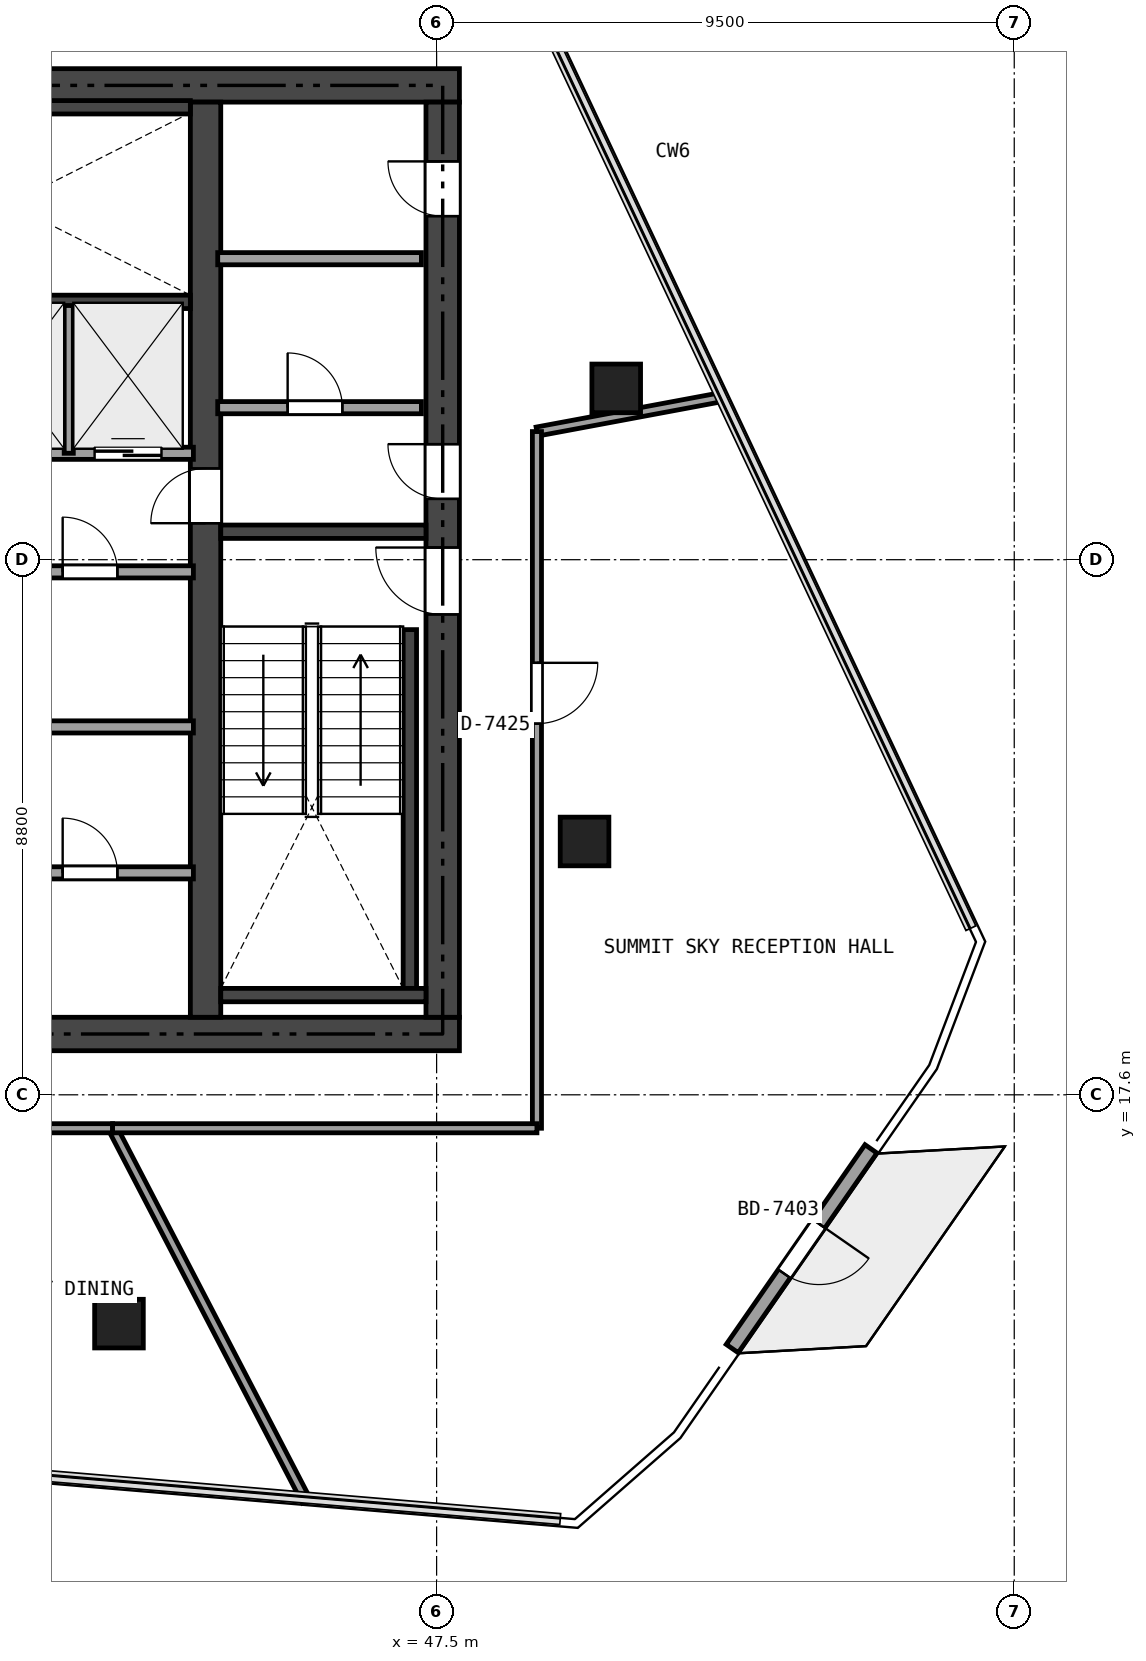
"""IFC4 building model, lengths in metres.
Left out: names, types, materials, properties, quantities, classifications, styles, units other than length and angle.
Written with IfcOpenShell. Run it as: python <this file> out.ifc"""

import sys

from ifc_helpers import new_model, si_unit, direction, frame, frame_2d, origin, origin_2d, place, context, subcontext, project, spatial, rectangle, extrude, element, fill, save


model = new_model("IFC4")
c1 = context("Model", 3, precision=1e-05, world=origin(), true_north=direction((0.0, 1.0)))
c2 = subcontext(c1, "Body", "Model", "MODEL_VIEW")
j1 = project(units=[si_unit("LENGTHUNIT", "METRE"), si_unit("PLANEANGLEUNIT", "RADIAN")], contexts=[c1])
p1 = place(None, origin())
s1 = spatial("IfcSite", under=j1, at=p1, CompositionType="ELEMENT")
p2 = place(p1, origin())
s2 = spatial("IfcBuilding", under=s1, at=p2, CompositionType="ELEMENT")
p3 = place(p2, frame((0.0, 0.0, 275.1)))
s3 = spatial("IfcBuildingStorey", under=s2, at=p3, CompositionType="ELEMENT", Elevation=275.1)
p4 = place(p3, frame((26.525, 18.6, 0.0), z_axis=(0.0, 0.0, 1.0), x_axis=(1.0, 0.0, 0.0)))
e1 = element("IfcWall", 1, at=p4, inside=s3, PredefinedType="SHEAR", context=c2, shape_type="SweptSolid", body=[
    extrude(rectangle(XDim=21.35, YDim=0.55, at=frame_2d((10.675, 0.0))), origin(), (0.0, 0.0, 1.0), 3.92),
])
p5 = place(p4, frame((12.4, 0.0, 0.0)))
e2 = element("IfcOpeningElement", 2, at=p5, cuts=e1, PredefinedType="OPENING", context=c2, shape_type="SweptSolid", body=[
    extrude(rectangle(XDim=1.15, YDim=2.15, at=frame_2d((0.575, 1.075))), frame((0.0, 0.285, 0.0), z_axis=(0.0, -1.0, 0.0), x_axis=(1.0, 0.0, 0.0)), (0.0, 0.0, 1.0), 0.57),
])
p6 = place(p4, frame((5.225, 0.0, 0.0)))
e3 = element("IfcOpeningElement", 3, at=p6, cuts=e1, PredefinedType="OPENING", context=c2, shape_type="SweptSolid", body=[
    extrude(rectangle(XDim=0.9, YDim=2.1, at=frame_2d((0.45, 1.05))), frame((0.0, 0.285, 0.0), z_axis=(0.0, -1.0, 0.0), x_axis=(1.0, 0.0, 0.0)), (0.0, 0.0, 1.0), 0.57),
])
p7 = place(p3, frame((26.525, 34.2, 0.0), z_axis=(0.0, 0.0, 1.0), x_axis=(1.0, 0.0, 0.0)))
e4 = element("IfcWall", 4, at=p7, inside=s3, PredefinedType="SHEAR", context=c2, shape_type="SweptSolid", body=[
    extrude(rectangle(XDim=21.35, YDim=0.55, at=frame_2d((10.675, 0.0))), origin(), (0.0, 0.0, 1.0), 3.92),
])
p8 = place(p7, frame((9.675, 0.0, 0.0)))
e5 = element("IfcOpeningElement", 5, at=p8, cuts=e4, PredefinedType="OPENING", context=c2, shape_type="SweptSolid", body=[
    extrude(rectangle(XDim=1.1, YDim=2.15, at=frame_2d((0.55, 1.075))), frame((0.0, 0.285, 0.0), z_axis=(0.0, -1.0, 0.0), x_axis=(1.0, 0.0, 0.0)), (0.0, 0.0, 1.0), 0.57),
])
p9 = place(p7, frame((1.925, 0.0, 0.0)))
e6 = element("IfcOpeningElement", 6, at=p9, cuts=e4, PredefinedType="OPENING", context=c2, shape_type="SweptSolid", body=[
    extrude(rectangle(XDim=0.9, YDim=2.1, at=frame_2d((0.45, 1.05))), frame((0.0, 0.285, 0.0), z_axis=(0.0, -1.0, 0.0), x_axis=(1.0, 0.0, 0.0)), (0.0, 0.0, 1.0), 0.57),
])
p10 = place(p7, frame((6.225, 0.0, 0.0)))
e7 = element("IfcOpeningElement", 7, at=p10, cuts=e4, PredefinedType="OPENING", context=c2, shape_type="SweptSolid", body=[
    extrude(rectangle(XDim=0.9, YDim=2.1, at=frame_2d((0.45, 1.05))), frame((0.0, 0.285, 0.0), z_axis=(0.0, -1.0, 0.0), x_axis=(1.0, 0.0, 0.0)), (0.0, 0.0, 1.0), 0.57),
])
p11 = place(p3, frame((47.6, 18.875, 0.0), z_axis=(0.0, 0.0, 1.0), x_axis=(0.0, 1.0, 0.0)))
e8 = element("IfcWall", 8, at=p11, inside=s3, PredefinedType="SHEAR", context=c2, shape_type="SweptSolid", body=[
    extrude(rectangle(XDim=15.05, YDim=0.55, at=frame_2d((7.525, 0.0))), origin(), (0.0, 0.0, 1.0), 3.92),
])
p12 = place(p11, frame((6.625, 0.0, 0.0)))
e9 = element("IfcOpeningElement", 9, at=p12, cuts=e8, PredefinedType="OPENING", context=c2, shape_type="SweptSolid", body=[
    extrude(rectangle(XDim=1.1, YDim=2.15, at=frame_2d((0.55, 1.075))), frame((0.0, 0.285, 0.0), z_axis=(0.0, -1.0, 0.0), x_axis=(1.0, 0.0, 0.0)), (0.0, 0.0, 1.0), 0.57),
])
p13 = place(p11, frame((8.525, 0.0, 0.0)))
e10 = element("IfcOpeningElement", 10, at=p13, cuts=e8, PredefinedType="OPENING", context=c2, shape_type="SweptSolid", body=[
    extrude(rectangle(XDim=0.9, YDim=2.1, at=frame_2d((0.45, 1.05))), frame((0.0, 0.285, 0.0), z_axis=(0.0, -1.0, 0.0), x_axis=(1.0, 0.0, 0.0)), (0.0, 0.0, 1.0), 0.57),
])
p14 = place(p11, frame((13.175, 0.0, 0.0)))
e11 = element("IfcOpeningElement", 11, at=p14, cuts=e8, PredefinedType="OPENING", context=c2, shape_type="SweptSolid", body=[
    extrude(rectangle(XDim=0.9, YDim=2.1, at=frame_2d((0.45, 1.05))), frame((0.0, 0.285, 0.0), z_axis=(0.0, -1.0, 0.0), x_axis=(1.0, 0.0, 0.0)), (0.0, 0.0, 1.0), 0.57),
])
p15 = place(p3, frame((43.7, 18.875, 0.0), z_axis=(0.0, 0.0, 1.0), x_axis=(0.0, 1.0, 0.0)))
e12 = element("IfcWall", 12, at=p15, inside=s3, PredefinedType="SHEAR", context=c2, shape_type="SweptSolid", body=[
    extrude(rectangle(XDim=15.05, YDim=0.5, at=frame_2d((7.525, 0.0))), origin(), (0.0, 0.0, 1.0), 3.92),
])
p16 = place(p15, frame((8.125, 0.0, 0.0)))
e13 = element("IfcOpeningElement", 13, at=p16, cuts=e12, PredefinedType="OPENING", context=c2, shape_type="SweptSolid", body=[
    extrude(rectangle(XDim=0.9, YDim=2.1, at=frame_2d((0.45, 1.05))), frame((0.0, 0.26, 0.0), z_axis=(0.0, -1.0, 0.0), x_axis=(1.0, 0.0, 0.0)), (0.0, 0.0, 1.0), 0.52),
])
p17 = place(p3, frame((43.95, 26.86, 0.0), z_axis=(0.0, 0.0, 1.0), x_axis=(1.0, 0.0, 0.0)))
e14 = element("IfcWall", 14, at=p17, inside=s3, PredefinedType="SHEAR", context=c2, shape_type="SweptSolid", body=[
    extrude(rectangle(XDim=3.375, YDim=0.22, at=frame_2d((1.688, 0.0))), origin(), (0.0, 0.0, 1.0), 3.92),
])
p18 = place(p3, frame((47.06, 19.35, 0.0), z_axis=(0.0, 0.0, 1.0), x_axis=(0.0, 1.0, 0.0)))
e15 = element("IfcWall", 15, at=p18, inside=s3, PredefinedType="SHEAR", context=c2, shape_type="SweptSolid", body=[
    extrude(rectangle(XDim=5.9, YDim=0.22, at=frame_2d((2.95, 0.0))), origin(), (0.0, 0.0, 1.0), 3.92),
])
p19 = place(p3, frame((43.95, 19.24, 0.0), z_axis=(0.0, 0.0, 1.0), x_axis=(1.0, 0.0, 0.0)))
e16 = element("IfcWall", 16, at=p19, inside=s3, PredefinedType="SHEAR", context=c2, shape_type="SweptSolid", body=[
    extrude(rectangle(XDim=3.375, YDim=0.22, at=frame_2d((1.688, 0.0))), origin(), (0.0, 0.0, 1.0), 3.92),
])
p20 = place(p3, frame((35.84, 30.64, 0.0), z_axis=(0.0, 0.0, 1.0), x_axis=(1.0, 0.0, 0.0)))
e17 = element("IfcWall", 17, at=p20, inside=s3, PredefinedType="SHEAR", context=c2, shape_type="SweptSolid", body=[
    extrude(rectangle(XDim=7.61, YDim=0.22, at=frame_2d((3.805, 0.0))), origin(), (0.0, 0.0, 1.0), 3.92),
])
p21 = place(p3, frame((37.55, 33.84, 0.0), z_axis=(0.0, 0.0, 1.0), x_axis=(1.0, 0.0, 0.0)))
e18 = element("IfcWall", 18, at=p21, inside=s3, PredefinedType="SHEAR", context=c2, shape_type="SweptSolid", body=[
    extrude(rectangle(XDim=5.9, YDim=0.22, at=frame_2d((2.95, 0.0))), origin(), (0.0, 0.0, 1.0), 3.92),
])
for number, where, z_axis, x_axis in (
    (19, (50.454, 29.217, 0.0), (0.0, 0.0, 1.0), (1.0, 0.0, 0.0)),
    (20, (42.276, 13.837, 0.0), (0.0, 0.0, 1.0), (1.0, 0.0, 0.0)),
    (21, (49.933, 21.766, 0.0), (0.0, 0.0, 1.0), (1.0, 0.0, 0.0)),
):
    element("IfcColumn", number, at=place(p3, frame(where, z_axis=z_axis, x_axis=x_axis)), inside=s3, PredefinedType="COLUMN", context=c2, shape_type="SweptSolid", body=[
        extrude(rectangle(XDim=0.8, YDim=0.8, at=origin_2d()), origin(), (0.0, 0.0, 1.0), 3.92),
    ])
p22 = place(p3, frame((54.644, 16.711, 0.0), z_axis=(0.0, 0.0, 1.0), x_axis=(-0.570644055542, -0.821197516968, 0.0)))
e22 = element("IfcWall", 22, at=p22, inside=s3, PredefinedType="SOLIDWALL", context=c2, shape_type="SweptSolid", body=[
    extrude(rectangle(XDim=3.999, YDim=0.24, at=frame_2d((2.0, 0.0))), origin(), (0.0, 0.0, 1.0), 3.92),
])
p23 = place(p22, frame((1.5, 0.0, 0.0)))
e23 = element("IfcOpeningElement", 23, at=p23, cuts=e22, PredefinedType="OPENING", context=c2, shape_type="SweptSolid", body=[
    extrude(rectangle(XDim=1.0, YDim=2.15, at=frame_2d((0.5, 1.075))), frame((0.0, 0.13, 0.0), z_axis=(0.0, -1.0, 0.0), x_axis=(1.0, 0.0, 0.0)), (0.0, 0.0, 1.0), 0.26),
])
p24 = place(p3, frame((43.9, 28.9, 0.0), z_axis=(0.0, 0.0, 1.0), x_axis=(1.0, 0.0, 0.0)))
e24 = element("IfcWall", 24, at=p24, inside=s3, PredefinedType="SOLIDWALL", context=c2, shape_type="SweptSolid", body=[
    extrude(rectangle(XDim=3.35, YDim=0.2, at=frame_2d((1.675, 0.0))), origin(), (0.0, 0.0, 1.0), 3.92),
])
p25 = place(p24, frame((1.15, 0.0, 0.0)))
e25 = element("IfcOpeningElement", 25, at=p25, cuts=e24, PredefinedType="OPENING", context=c2, shape_type="SweptSolid", body=[
    extrude(rectangle(XDim=0.9, YDim=2.1, at=frame_2d((0.45, 1.05))), frame((0.0, 0.11, 0.0), z_axis=(0.0, -1.0, 0.0), x_axis=(1.0, 0.0, 0.0)), (0.0, 0.0, 1.0), 0.22),
])
p26 = place(p3, frame((43.9, 31.35, 0.0), z_axis=(0.0, 0.0, 1.0), x_axis=(1.0, 0.0, 0.0)))
e26 = element("IfcWall", 26, at=p26, inside=s3, PredefinedType="SOLIDWALL", context=c2, shape_type="SweptSolid", body=[
    extrude(rectangle(XDim=3.35, YDim=0.2, at=frame_2d((1.675, 0.0))), origin(), (0.0, 0.0, 1.0), 3.549),
])
p27 = place(p3, frame((35.62, 28.15, 0.0), z_axis=(0.0, 0.0, 1.0), x_axis=(1.0, 0.0, 0.0)))
e27 = element("IfcWall", 27, at=p27, inside=s3, PredefinedType="SOLIDWALL", context=c2, shape_type="SweptSolid", body=[
    extrude(rectangle(XDim=7.88, YDim=0.2, at=frame_2d((3.94, 0.0))), origin(), (0.0, 0.0, 1.0), 3.92),
])
p28 = place(p27, frame((0.405, 0.0, 0.0)))
e28 = element("IfcOpeningElement", 28, at=p28, cuts=e27, PredefinedType="OPENING", context=c2, shape_type="SweptSolid", body=[
    extrude(rectangle(XDim=1.1, YDim=2.15, at=frame_2d((0.55, 1.075))), frame((0.0, 0.11, 0.0), z_axis=(0.0, -1.0, 0.0), x_axis=(1.0, 0.0, 0.0)), (0.0, 0.0, 1.0), 0.22),
])
p29 = place(p27, frame((2.355, 0.0, 0.0)))
e29 = element("IfcOpeningElement", 29, at=p29, cuts=e27, PredefinedType="OPENING", context=c2, shape_type="SweptSolid", body=[
    extrude(rectangle(XDim=1.1, YDim=2.15, at=frame_2d((0.55, 1.075))), frame((0.0, 0.11, 0.0), z_axis=(0.0, -1.0, 0.0), x_axis=(1.0, 0.0, 0.0)), (0.0, 0.0, 1.0), 0.22),
])
p30 = place(p27, frame((4.305, 0.0, 0.0)))
e30 = element("IfcOpeningElement", 30, at=p30, cuts=e27, PredefinedType="OPENING", context=c2, shape_type="SweptSolid", body=[
    extrude(rectangle(XDim=1.1, YDim=2.15, at=frame_2d((0.55, 1.075))), frame((0.0, 0.11, 0.0), z_axis=(0.0, -1.0, 0.0), x_axis=(1.0, 0.0, 0.0)), (0.0, 0.0, 1.0), 0.22),
])
p31 = place(p27, frame((6.255, 0.0, 0.0)))
e31 = element("IfcOpeningElement", 31, at=p31, cuts=e27, PredefinedType="OPENING", context=c2, shape_type="SweptSolid", body=[
    extrude(rectangle(XDim=1.1, YDim=2.15, at=frame_2d((0.55, 1.075))), frame((0.0, 0.11, 0.0), z_axis=(0.0, -1.0, 0.0), x_axis=(1.0, 0.0, 0.0)), (0.0, 0.0, 1.0), 0.22),
])
p32 = place(p3, frame((35.62, 26.2, 0.0), z_axis=(0.0, 0.0, 1.0), x_axis=(1.0, 0.0, 0.0)))
e32 = element("IfcWall", 32, at=p32, inside=s3, PredefinedType="SOLIDWALL", context=c2, shape_type="SweptSolid", body=[
    extrude(rectangle(XDim=7.88, YDim=0.2, at=frame_2d((3.94, 0.0))), origin(), (0.0, 0.0, 1.0), 3.92),
])
p33 = place(p32, frame((1.13, 0.0, 0.0)))
e33 = element("IfcOpeningElement", 33, at=p33, cuts=e32, PredefinedType="OPENING", context=c2, shape_type="SweptSolid", body=[
    extrude(rectangle(XDim=0.9, YDim=2.1, at=frame_2d((0.45, 1.05))), frame((0.0, 0.11, 0.0), z_axis=(0.0, -1.0, 0.0), x_axis=(1.0, 0.0, 0.0)), (0.0, 0.0, 1.0), 0.22),
])
p34 = place(p32, frame((5.73, 0.0, 0.0)))
e34 = element("IfcOpeningElement", 34, at=p34, cuts=e32, PredefinedType="OPENING", context=c2, shape_type="SweptSolid", body=[
    extrude(rectangle(XDim=0.9, YDim=2.1, at=frame_2d((0.45, 1.05))), frame((0.0, 0.11, 0.0), z_axis=(0.0, -1.0, 0.0), x_axis=(1.0, 0.0, 0.0)), (0.0, 0.0, 1.0), 0.22),
])
p35 = place(p3, frame((35.62, 23.65, 0.0), z_axis=(0.0, 0.0, 1.0), x_axis=(1.0, 0.0, 0.0)))
e35 = element("IfcWall", 35, at=p35, inside=s3, PredefinedType="SOLIDWALL", context=c2, shape_type="SweptSolid", body=[
    extrude(rectangle(XDim=7.88, YDim=0.2, at=frame_2d((3.94, 0.0))), origin(), (0.0, 0.0, 1.0), 3.441),
])
p36 = place(p3, frame((35.62, 21.25, 0.0), z_axis=(0.0, 0.0, 1.0), x_axis=(1.0, 0.0, 0.0)))
e36 = element("IfcWall", 36, at=p36, inside=s3, PredefinedType="SOLIDWALL", context=c2, shape_type="SweptSolid", body=[
    extrude(rectangle(XDim=7.88, YDim=0.2, at=frame_2d((3.94, 0.0))), origin(), (0.0, 0.0, 1.0), 3.92),
])
p37 = place(p36, frame((1.13, 0.0, 0.0)))
e37 = element("IfcOpeningElement", 37, at=p37, cuts=e36, PredefinedType="OPENING", context=c2, shape_type="SweptSolid", body=[
    extrude(rectangle(XDim=0.9, YDim=2.1, at=frame_2d((0.45, 1.05))), frame((0.0, 0.11, 0.0), z_axis=(0.0, -1.0, 0.0), x_axis=(1.0, 0.0, 0.0)), (0.0, 0.0, 1.0), 0.22),
])
p38 = place(p36, frame((5.73, 0.0, 0.0)))
e38 = element("IfcOpeningElement", 38, at=p38, cuts=e36, PredefinedType="OPENING", context=c2, shape_type="SweptSolid", body=[
    extrude(rectangle(XDim=0.9, YDim=2.1, at=frame_2d((0.45, 1.05))), frame((0.0, 0.11, 0.0), z_axis=(0.0, -1.0, 0.0), x_axis=(1.0, 0.0, 0.0)), (0.0, 0.0, 1.0), 0.22),
])
p39 = place(p3, frame((41.45, 28.15, 0.0), z_axis=(0.0, 0.0, 1.0), x_axis=(0.0, 1.0, 0.0)))
e39 = element("IfcWall", 39, at=p39, inside=s3, PredefinedType="PARTITIONING", context=c2, shape_type="SweptSolid", body=[
    extrude(rectangle(XDim=2.43, YDim=0.15, at=frame_2d((1.215, 0.0))), origin(), (0.0, 0.0, 1.0), 3.92),
])
p40 = place(p3, frame((45.358, 10.921, 0.0), z_axis=(0.0, 0.0, 1.0), x_axis=(-0.461336045476, 0.887225480441, 0.0)))
e40 = element("IfcWall", 40, at=p40, inside=s3, PredefinedType="PARTITIONING", context=c2, shape_type="SweptSolid", body=[
    extrude(rectangle(XDim=6.908, YDim=0.15, at=frame_2d((3.454, 0.0))), origin(), (0.0, 0.0, 1.0), 3.445),
])
p41 = place(p3, frame((42.171, 17.05, 0.0), z_axis=(0.0, 0.0, 1.0), x_axis=(-1.0, 0.0, 0.0)))
e41 = element("IfcWall", 41, at=p41, inside=s3, PredefinedType="PARTITIONING", context=c2, shape_type="SweptSolid", body=[
    extrude(rectangle(XDim=14.0, YDim=0.15, at=frame_2d((7.0, 0.0))), origin(), (0.0, 0.0, 1.0), 3.365),
])
p42 = place(p41, frame((6.5, 0.0, 0.0)))
e42 = element("IfcOpeningElement", 42, at=p42, cuts=e41, PredefinedType="OPENING", context=c2, shape_type="SweptSolid", body=[
    extrude(rectangle(XDim=1.0, YDim=2.15, at=frame_2d((0.5, 1.075))), frame((0.0, 0.085, 0.0), z_axis=(0.0, -1.0, 0.0), x_axis=(1.0, 0.0, 0.0)), (0.0, 0.0, 1.0), 0.17),
])
p43 = place(p3, frame((52.221, 29.08, 0.0), z_axis=(0.0, 0.0, 1.0), x_axis=(-0.983035469724, -0.183415553497, 0.0)))
e43 = element("IfcWall", 43, at=p43, inside=s3, PredefinedType="PARTITIONING", context=c2, shape_type="SweptSolid", body=[
    extrude(rectangle(XDim=3.124, YDim=0.15, at=frame_2d((1.562, 0.0))), origin(), (0.0, 0.0, 1.0), 3.445),
])
p44 = place(p3, frame((49.15, 28.507, 0.0), z_axis=(0.0, 0.0, 1.0), x_axis=(0.0, -1.0, 0.0)))
e44 = element("IfcWall", 44, at=p44, inside=s3, PredefinedType="PARTITIONING", context=c2, shape_type="SweptSolid", body=[
    extrude(rectangle(XDim=11.457, YDim=0.15, at=frame_2d((5.729, 0.0))), origin(), (0.0, 0.0, 1.0), 3.365),
])
p45 = place(p44, frame((3.803, 0.0, 0.0)))
e45 = element("IfcOpeningElement", 45, at=p45, cuts=e44, PredefinedType="OPENING", context=c2, shape_type="SweptSolid", body=[
    extrude(rectangle(XDim=1.0, YDim=2.15, at=frame_2d((0.5, 1.075))), frame((0.0, 0.085, 0.0), z_axis=(0.0, -1.0, 0.0), x_axis=(1.0, 0.0, 0.0)), (0.0, 0.0, 1.0), 0.17),
])
p46 = place(p3, frame((49.15, 17.05, 0.0), z_axis=(0.0, 0.0, 1.0), x_axis=(-1.0, 0.0, 0.0)))
e46 = element("IfcWall", 46, at=p46, inside=s3, PredefinedType="PARTITIONING", context=c2, shape_type="SweptSolid", body=[
    extrude(rectangle(XDim=6.979, YDim=0.15, at=frame_2d((3.49, 0.0))), origin(), (0.0, 0.0, 1.0), 3.445),
])
p47 = place(p23, origin())
e47 = element("IfcDoor", 47, at=p47, inside=s3, OperationType="SINGLE_SWING_LEFT", PredefinedType="DOOR", context=c2, shape_type="SweptSolid", body=[
    extrude(rectangle(XDim=1.0, YDim=2.15, at=frame_2d((0.5, 1.075))), frame((0.0, 0.025, 0.0), z_axis=(0.0, -1.0, 0.0), x_axis=(1.0, 0.0, 0.0)), (0.0, 0.0, 1.0), 0.05),
])
fill(e23, e47)
p48 = place(p12, origin())
e48 = element("IfcDoor", 48, at=p48, inside=s3, OperationType="SINGLE_SWING_RIGHT", PredefinedType="DOOR", context=c2, shape_type="SweptSolid", body=[
    extrude(rectangle(XDim=1.1, YDim=2.15, at=frame_2d((0.55, 1.075))), frame((0.0, 0.025, 0.0), z_axis=(0.0, -1.0, 0.0), x_axis=(1.0, 0.0, 0.0)), (0.0, 0.0, 1.0), 0.05),
])
fill(e9, e48)
p49 = place(p16, origin())
e49 = element("IfcDoor", 49, at=p49, inside=s3, OperationType="SINGLE_SWING_LEFT", PredefinedType="DOOR", context=c2, shape_type="SweptSolid", body=[
    extrude(rectangle(XDim=0.9, YDim=2.1, at=frame_2d((0.45, 1.05))), frame((0.0, 0.025, 0.0), z_axis=(0.0, -1.0, 0.0), x_axis=(1.0, 0.0, 0.0)), (0.0, 0.0, 1.0), 0.05),
])
fill(e13, e49)
p50 = place(p13, origin())
e50 = element("IfcDoor", 50, at=p50, inside=s3, OperationType="SINGLE_SWING_RIGHT", PredefinedType="DOOR", context=c2, shape_type="SweptSolid", body=[
    extrude(rectangle(XDim=0.9, YDim=2.1, at=frame_2d((0.45, 1.05))), frame((0.0, 0.025, 0.0), z_axis=(0.0, -1.0, 0.0), x_axis=(1.0, 0.0, 0.0)), (0.0, 0.0, 1.0), 0.05),
])
fill(e10, e50)
p51 = place(p25, origin())
e51 = element("IfcDoor", 51, at=p51, inside=s3, OperationType="SINGLE_SWING_LEFT", PredefinedType="DOOR", context=c2, shape_type="SweptSolid", body=[
    extrude(rectangle(XDim=0.9, YDim=2.1, at=frame_2d((0.45, 1.05))), frame((0.0, 0.025, 0.0), z_axis=(0.0, -1.0, 0.0), x_axis=(1.0, 0.0, 0.0)), (0.0, 0.0, 1.0), 0.05),
])
fill(e25, e51)
p52 = place(p14, origin())
e52 = element("IfcDoor", 52, at=p52, inside=s3, OperationType="SINGLE_SWING_RIGHT", PredefinedType="DOOR", context=c2, shape_type="SweptSolid", body=[
    extrude(rectangle(XDim=0.9, YDim=2.1, at=frame_2d((0.45, 1.05))), frame((0.0, 0.025, 0.0), z_axis=(0.0, -1.0, 0.0), x_axis=(1.0, 0.0, 0.0)), (0.0, 0.0, 1.0), 0.05),
])
fill(e11, e52)
p53 = place(p38, origin())
e53 = element("IfcDoor", 53, at=p53, inside=s3, OperationType="SINGLE_SWING_LEFT", PredefinedType="DOOR", context=c2, shape_type="SweptSolid", body=[
    extrude(rectangle(XDim=0.9, YDim=2.1, at=frame_2d((0.45, 1.05))), frame((0.0, 0.025, 0.0), z_axis=(0.0, -1.0, 0.0), x_axis=(1.0, 0.0, 0.0)), (0.0, 0.0, 1.0), 0.05),
])
fill(e38, e53)
p54 = place(p34, origin())
e54 = element("IfcDoor", 54, at=p54, inside=s3, OperationType="SINGLE_SWING_LEFT", PredefinedType="DOOR", context=c2, shape_type="SweptSolid", body=[
    extrude(rectangle(XDim=0.9, YDim=2.1, at=frame_2d((0.45, 1.05))), frame((0.0, 0.025, 0.0), z_axis=(0.0, -1.0, 0.0), x_axis=(1.0, 0.0, 0.0)), (0.0, 0.0, 1.0), 0.05),
])
fill(e34, e54)
p55 = place(p31, origin())
e55 = element("IfcDoor", 55, at=p55, inside=s3, OperationType="SLIDING_TO_LEFT", PredefinedType="DOOR", context=c2, shape_type="SweptSolid", body=[
    extrude(rectangle(XDim=1.1, YDim=2.15, at=frame_2d((0.55, 1.075))), frame((0.0, 0.025, 0.0), z_axis=(0.0, -1.0, 0.0), x_axis=(1.0, 0.0, 0.0)), (0.0, 0.0, 1.0), 0.05),
])
fill(e31, e55)
p56 = place(p45, origin())
e56 = element("IfcDoor", 56, at=p56, inside=s3, OperationType="SINGLE_SWING_LEFT", PredefinedType="DOOR", context=c2, shape_type="SweptSolid", body=[
    extrude(rectangle(XDim=1.0, YDim=2.15, at=frame_2d((0.5, 1.075))), frame((0.0, 0.025, 0.0), z_axis=(0.0, -1.0, 0.0), x_axis=(1.0, 0.0, 0.0)), (0.0, 0.0, 1.0), 0.05),
])
fill(e45, e56)
save(model, sys.argv[1])
